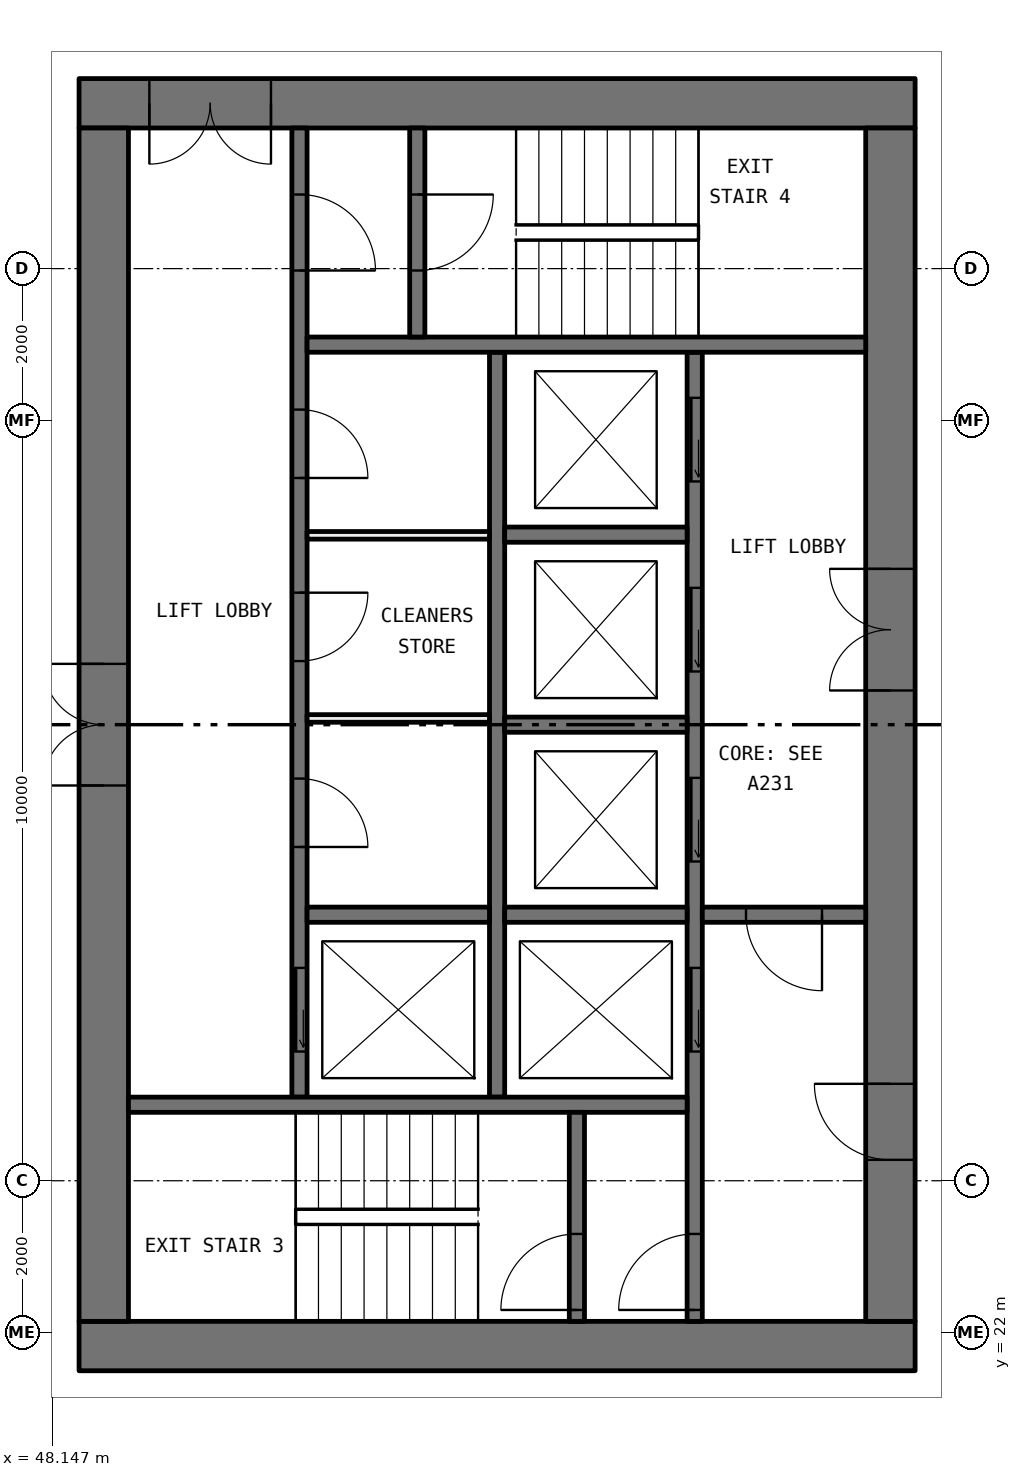
"""IFC4 building model, lengths in metres.
Left out: names, types, materials, properties, quantities, classifications, styles, units other than length and angle.
Written with IfcOpenShell. Run it as: python <this file> out.ifc"""

import sys

from ifc_helpers import new_model, si_unit, direction, frame, frame_2d, origin, place, context, subcontext, project, spatial, rectangle, extrude, element, fill, save


model = new_model("IFC4")
c1 = context("Model", 3, precision=1e-05, world=origin(), true_north=direction((0.0, 1.0)))
c2 = subcontext(c1, "Body", "Model", "MODEL_VIEW")
j1 = project(units=[si_unit("LENGTHUNIT", "METRE"), si_unit("PLANEANGLEUNIT", "RADIAN")], contexts=[c1])
p1 = place(None, origin())
s1 = spatial("IfcSite", under=j1, at=p1, CompositionType="ELEMENT")
p2 = place(p1, origin())
s2 = spatial("IfcBuilding", under=s1, at=p2, CompositionType="ELEMENT")
p3 = place(p2, frame((0.0, 0.0, 117.3)))
s3 = spatial("IfcBuildingStorey", under=s2, at=p3, CompositionType="ELEMENT", Elevation=117.3)
p4 = place(p3, frame((59.5, 21.825, 0.0), z_axis=(0.0, 0.0, 1.0), x_axis=(-1.0, 0.0, 0.0)))
e1 = element("IfcWall", 1, at=p4, inside=s3, PredefinedType="SHEAR", context=c2, shape_type="SweptSolid", body=[
    extrude(rectangle(XDim=11.0, YDim=0.65, at=frame_2d((5.5, 0.0))), origin(), (0.0, 0.0, 1.0), 3.05),
])
p5 = place(p3, frame((59.5, 38.175, 0.0), z_axis=(0.0, 0.0, 1.0), x_axis=(-1.0, 0.0, 0.0)))
e2 = element("IfcWall", 2, at=p5, inside=s3, PredefinedType="SHEAR", context=c2, shape_type="SweptSolid", body=[
    extrude(rectangle(XDim=11.0, YDim=0.65, at=frame_2d((5.5, 0.0))), origin(), (0.0, 0.0, 1.0), 3.05),
])
p6 = place(p5, frame((8.475, 0.0, 0.0)))
e3 = element("IfcOpeningElement", 3, at=p6, cuts=e2, PredefinedType="OPENING", context=c2, shape_type="SweptSolid", body=[
    extrude(rectangle(XDim=1.6, YDim=2.1, at=frame_2d((0.8, 1.05))), frame((0.0, 0.335, 0.0), z_axis=(0.0, -1.0, 0.0), x_axis=(1.0, 0.0, 0.0)), (0.0, 0.0, 1.0), 0.67),
])
p7 = place(p3, frame((59.175, 22.15, 0.0), z_axis=(0.0, 0.0, 1.0), x_axis=(0.0, 1.0, 0.0)))
e4 = element("IfcWall", 4, at=p7, inside=s3, PredefinedType="SHEAR", context=c2, shape_type="SweptSolid", body=[
    extrude(rectangle(XDim=15.7, YDim=0.65, at=frame_2d((7.85, 0.0))), origin(), (0.0, 0.0, 1.0), 3.05),
])
p8 = place(p7, frame((8.3, 0.0, 0.0)))
e5 = element("IfcOpeningElement", 5, at=p8, cuts=e4, PredefinedType="OPENING", context=c2, shape_type="SweptSolid", body=[
    extrude(rectangle(XDim=1.6, YDim=2.1, at=frame_2d((0.8, 1.05))), frame((0.0, 0.335, 0.0), z_axis=(0.0, -1.0, 0.0), x_axis=(1.0, 0.0, 0.0)), (0.0, 0.0, 1.0), 0.67),
])
p9 = place(p7, frame((2.125, 0.0, 0.0)))
e6 = element("IfcOpeningElement", 6, at=p9, cuts=e4, PredefinedType="OPENING", context=c2, shape_type="SweptSolid", body=[
    extrude(rectangle(XDim=1.0, YDim=2.1, at=frame_2d((0.5, 1.05))), frame((0.0, 0.335, 0.0), z_axis=(0.0, -1.0, 0.0), x_axis=(1.0, 0.0, 0.0)), (0.0, 0.0, 1.0), 0.67),
])
p10 = place(p3, frame((48.825, 22.15, 0.0), z_axis=(0.0, 0.0, 1.0), x_axis=(0.0, 1.0, 0.0)))
e7 = element("IfcWall", 7, at=p10, inside=s3, PredefinedType="SHEAR", context=c2, shape_type="SweptSolid", body=[
    extrude(rectangle(XDim=15.7, YDim=0.65, at=frame_2d((7.85, 0.0))), origin(), (0.0, 0.0, 1.0), 3.05),
])
p11 = place(p10, frame((7.05, 0.0, 0.0)))
e8 = element("IfcOpeningElement", 8, at=p11, cuts=e7, PredefinedType="OPENING", context=c2, shape_type="SweptSolid", body=[
    extrude(rectangle(XDim=1.6, YDim=2.1, at=frame_2d((0.8, 1.05))), frame((0.0, 0.335, 0.0), z_axis=(0.0, -1.0, 0.0), x_axis=(1.0, 0.0, 0.0)), (0.0, 0.0, 1.0), 0.67),
])
p12 = place(p3, frame((56.6, 22.15, 0.0), z_axis=(0.0, 0.0, 1.0), x_axis=(0.0, 1.0, 0.0)))
e9 = element("IfcWall", 9, at=p12, inside=s3, PredefinedType="SOLIDWALL", context=c2, shape_type="SweptSolid", body=[
    extrude(rectangle(XDim=12.75, YDim=0.2, at=frame_2d((6.375, 0.0))), origin(), (0.0, 0.0, 1.0), 3.05),
])
p13 = place(p12, frame((3.55, 0.0, 0.0)))
e10 = element("IfcOpeningElement", 10, at=p13, cuts=e9, PredefinedType="OPENING", context=c2, shape_type="SweptSolid", body=[
    extrude(rectangle(XDim=1.1, YDim=2.1, at=frame_2d((0.55, 1.05))), frame((0.0, 0.11, 0.0), z_axis=(0.0, -1.0, 0.0), x_axis=(1.0, 0.0, 0.0)), (0.0, 0.0, 1.0), 0.22),
])
p14 = place(p12, frame((6.05, 0.0, 0.0)))
e11 = element("IfcOpeningElement", 11, at=p14, cuts=e9, PredefinedType="OPENING", context=c2, shape_type="SweptSolid", body=[
    extrude(rectangle(XDim=1.1, YDim=2.1, at=frame_2d((0.55, 1.05))), frame((0.0, 0.11, 0.0), z_axis=(0.0, -1.0, 0.0), x_axis=(1.0, 0.0, 0.0)), (0.0, 0.0, 1.0), 0.22),
])
p15 = place(p12, frame((8.55, 0.0, 0.0)))
e12 = element("IfcOpeningElement", 12, at=p15, cuts=e9, PredefinedType="OPENING", context=c2, shape_type="SweptSolid", body=[
    extrude(rectangle(XDim=1.1, YDim=2.1, at=frame_2d((0.55, 1.05))), frame((0.0, 0.11, 0.0), z_axis=(0.0, -1.0, 0.0), x_axis=(1.0, 0.0, 0.0)), (0.0, 0.0, 1.0), 0.22),
])
p16 = place(p12, frame((11.05, 0.0, 0.0)))
e13 = element("IfcOpeningElement", 13, at=p16, cuts=e9, PredefinedType="OPENING", context=c2, shape_type="SweptSolid", body=[
    extrude(rectangle(XDim=1.1, YDim=2.1, at=frame_2d((0.55, 1.05))), frame((0.0, 0.11, 0.0), z_axis=(0.0, -1.0, 0.0), x_axis=(1.0, 0.0, 0.0)), (0.0, 0.0, 1.0), 0.22),
])
p17 = place(p12, frame((0.15, 0.0, 0.0)))
e14 = element("IfcOpeningElement", 14, at=p17, cuts=e9, PredefinedType="OPENING", context=c2, shape_type="SweptSolid", body=[
    extrude(rectangle(XDim=1.0, YDim=2.1, at=frame_2d((0.5, 1.05))), frame((0.0, 0.11, 0.0), z_axis=(0.0, -1.0, 0.0), x_axis=(1.0, 0.0, 0.0)), (0.0, 0.0, 1.0), 0.22),
])
p18 = place(p3, frame((51.4, 25.1, 0.0), z_axis=(0.0, 0.0, 1.0), x_axis=(0.0, 1.0, 0.0)))
e15 = element("IfcWall", 15, at=p18, inside=s3, PredefinedType="SOLIDWALL", context=c2, shape_type="SweptSolid", body=[
    extrude(rectangle(XDim=12.75, YDim=0.2, at=frame_2d((6.375, 0.0))), origin(), (0.0, 0.0, 1.0), 3.05),
])
p19 = place(p18, frame((0.6, 0.0, 0.0)))
e16 = element("IfcOpeningElement", 16, at=p19, cuts=e15, PredefinedType="OPENING", context=c2, shape_type="SweptSolid", body=[
    extrude(rectangle(XDim=1.1, YDim=2.1, at=frame_2d((0.55, 1.05))), frame((0.0, 0.11, 0.0), z_axis=(0.0, -1.0, 0.0), x_axis=(1.0, 0.0, 0.0)), (0.0, 0.0, 1.0), 0.22),
])
p20 = place(p18, frame((10.875, 0.0, 0.0)))
e17 = element("IfcOpeningElement", 17, at=p20, cuts=e15, PredefinedType="OPENING", context=c2, shape_type="SweptSolid", body=[
    extrude(rectangle(XDim=1.0, YDim=2.1, at=frame_2d((0.5, 1.05))), frame((0.0, 0.11, 0.0), z_axis=(0.0, -1.0, 0.0), x_axis=(1.0, 0.0, 0.0)), (0.0, 0.0, 1.0), 0.22),
])
p21 = place(p18, frame((3.291, 0.0, 0.0)))
e18 = element("IfcOpeningElement", 18, at=p21, cuts=e15, PredefinedType="OPENING", context=c2, shape_type="SweptSolid", body=[
    extrude(rectangle(XDim=0.9, YDim=2.1, at=frame_2d((0.45, 1.05))), frame((0.0, 0.11, 0.0), z_axis=(0.0, -1.0, 0.0), x_axis=(1.0, 0.0, 0.0)), (0.0, 0.0, 1.0), 0.22),
])
p22 = place(p18, frame((5.737, 0.0, 0.0)))
e19 = element("IfcOpeningElement", 19, at=p22, cuts=e15, PredefinedType="OPENING", context=c2, shape_type="SweptSolid", body=[
    extrude(rectangle(XDim=0.9, YDim=2.1, at=frame_2d((0.45, 1.05))), frame((0.0, 0.11, 0.0), z_axis=(0.0, -1.0, 0.0), x_axis=(1.0, 0.0, 0.0)), (0.0, 0.0, 1.0), 0.22),
])
p23 = place(p18, frame((8.146, 0.0, 0.0)))
e20 = element("IfcOpeningElement", 20, at=p23, cuts=e15, PredefinedType="OPENING", context=c2, shape_type="SweptSolid", body=[
    extrude(rectangle(XDim=0.9, YDim=2.1, at=frame_2d((0.45, 1.05))), frame((0.0, 0.11, 0.0), z_axis=(0.0, -1.0, 0.0), x_axis=(1.0, 0.0, 0.0)), (0.0, 0.0, 1.0), 0.22),
])
p24 = place(p3, frame((54.0, 25.1, 0.0), z_axis=(0.0, 0.0, 1.0), x_axis=(0.0, 1.0, 0.0)))
e21 = element("IfcWall", 21, at=p24, inside=s3, PredefinedType="SOLIDWALL", context=c2, shape_type="SweptSolid", body=[
    extrude(rectangle(XDim=9.8, YDim=0.2, at=frame_2d((4.9, 0.0))), origin(), (0.0, 0.0, 1.0), 3.05),
])
for number, where, z_axis, x_axis in (
    (22, (56.5, 25.0, 0.0), (0.0, 0.0, 1.0), (-1.0, 0.0, 0.0)),
    (23, (58.85, 35.0, 0.0), (0.0, 0.0, 1.0), (-1.0, 0.0, 0.0)),
):
    element("IfcWall", number, at=place(p3, frame(where, z_axis=z_axis, x_axis=x_axis)), inside=s3, PredefinedType="SOLIDWALL", context=c2, shape_type="SweptSolid", body=[
        extrude(rectangle(XDim=7.35, YDim=0.2, at=frame_2d((3.675, 0.0))), origin(), (0.0, 0.0, 1.0), 3.05),
    ])
p25 = place(p3, frame((58.85, 27.5, 0.0), z_axis=(0.0, 0.0, 1.0), x_axis=(-1.0, 0.0, 0.0)))
e24 = element("IfcWall", 24, at=p25, inside=s3, PredefinedType="SOLIDWALL", context=c2, shape_type="SweptSolid", body=[
    extrude(rectangle(XDim=2.15, YDim=0.2, at=frame_2d((1.075, 0.0))), origin(), (0.0, 0.0, 1.0), 3.05),
])
p26 = place(p25, frame((0.575, 0.0, 0.0)))
e25 = element("IfcOpeningElement", 25, at=p26, cuts=e24, PredefinedType="OPENING", context=c2, shape_type="SweptSolid", body=[
    extrude(rectangle(XDim=1.0, YDim=2.1, at=frame_2d((0.5, 1.05))), frame((0.0, 0.11, 0.0), z_axis=(0.0, -1.0, 0.0), x_axis=(1.0, 0.0, 0.0)), (0.0, 0.0, 1.0), 0.22),
])
p27 = place(p3, frame((55.05, 22.15, 0.0), z_axis=(0.0, 0.0, 1.0), x_axis=(0.0, 1.0, 0.0)))
e26 = element("IfcWall", 26, at=p27, inside=s3, PredefinedType="SOLIDWALL", context=c2, shape_type="SweptSolid", body=[
    extrude(rectangle(XDim=2.75, YDim=0.2, at=frame_2d((1.375, 0.0))), origin(), (0.0, 0.0, 1.0), 3.05),
])
p28 = place(p27, frame((0.15, 0.0, 0.0)))
e27 = element("IfcOpeningElement", 27, at=p28, cuts=e26, PredefinedType="OPENING", context=c2, shape_type="SweptSolid", body=[
    extrude(rectangle(XDim=1.0, YDim=2.1, at=frame_2d((0.5, 1.05))), frame((0.0, 0.11, 0.0), z_axis=(0.0, -1.0, 0.0), x_axis=(1.0, 0.0, 0.0)), (0.0, 0.0, 1.0), 0.22),
])
p29 = place(p3, frame((52.95, 35.1, 0.0), z_axis=(0.0, 0.0, 1.0), x_axis=(0.0, 1.0, 0.0)))
e28 = element("IfcWall", 28, at=p29, inside=s3, PredefinedType="SOLIDWALL", context=c2, shape_type="SweptSolid", body=[
    extrude(rectangle(XDim=2.75, YDim=0.2, at=frame_2d((1.375, 0.0))), origin(), (0.0, 0.0, 1.0), 3.05),
])
p30 = place(p29, frame((0.875, 0.0, 0.0)))
e29 = element("IfcOpeningElement", 29, at=p30, cuts=e28, PredefinedType="OPENING", context=c2, shape_type="SweptSolid", body=[
    extrude(rectangle(XDim=1.0, YDim=2.1, at=frame_2d((0.5, 1.05))), frame((0.0, 0.11, 0.0), z_axis=(0.0, -1.0, 0.0), x_axis=(1.0, 0.0, 0.0)), (0.0, 0.0, 1.0), 0.22),
])
for number, where, z_axis, x_axis in (
    (30, (56.5, 27.5, 0.0), (0.0, 0.0, 1.0), (-1.0, 0.0, 0.0)),
    (31, (56.5, 30.0, 0.0), (0.0, 0.0, 1.0), (-1.0, 0.0, 0.0)),
    (32, (56.5, 32.5, 0.0), (0.0, 0.0, 1.0), (-1.0, 0.0, 0.0)),
    (33, (53.9, 27.5, 0.0), (0.0, 0.0, 1.0), (-1.0, 0.0, 0.0)),
):
    element("IfcWall", number, at=place(p3, frame(where, z_axis=z_axis, x_axis=x_axis)), inside=s3, PredefinedType="SOLIDWALL", context=c2, shape_type="SweptSolid", body=[
        extrude(rectangle(XDim=2.4, YDim=0.2, at=frame_2d((1.2, 0.0))), origin(), (0.0, 0.0, 1.0), 3.05),
    ])
for number, where, z_axis, x_axis in (
    (34, (53.9, 30.082, 0.0), (0.0, 0.0, 1.0), (-1.0, 0.0, 0.0)),
    (35, (53.9, 32.491, 0.0), (0.0, 0.0, 1.0), (-1.0, 0.0, 0.0)),
):
    element("IfcWall", number, at=place(p3, frame(where, z_axis=z_axis, x_axis=x_axis)), inside=s3, PredefinedType="PARTITIONING", context=c2, shape_type="SweptSolid", body=[
        extrude(rectangle(XDim=2.4, YDim=0.1, at=frame_2d((1.2, 0.0))), origin(), (0.0, 0.0, 1.0), 3.05),
    ])
p31 = place(p19, origin())
e36 = element("IfcDoor", 36, at=p31, inside=s3, OperationType="SLIDING_TO_LEFT", PredefinedType="DOOR", context=c2, shape_type="SweptSolid", body=[
    extrude(rectangle(XDim=1.1, YDim=2.1, at=frame_2d((0.55, 1.05))), frame((0.0, 0.025, 0.0), z_axis=(0.0, -1.0, 0.0), x_axis=(1.0, 0.0, 0.0)), (0.0, 0.0, 1.0), 0.05),
])
fill(e16, e36)
p32 = place(p13, origin())
e37 = element("IfcDoor", 37, at=p32, inside=s3, OperationType="SLIDING_TO_LEFT", PredefinedType="DOOR", context=c2, shape_type="SweptSolid", body=[
    extrude(rectangle(XDim=1.1, YDim=2.1, at=frame_2d((0.55, 1.05))), frame((0.0, 0.025, 0.0), z_axis=(0.0, -1.0, 0.0), x_axis=(1.0, 0.0, 0.0)), (0.0, 0.0, 1.0), 0.05),
])
fill(e10, e37)
p33 = place(p14, origin())
e38 = element("IfcDoor", 38, at=p33, inside=s3, OperationType="SLIDING_TO_LEFT", PredefinedType="DOOR", context=c2, shape_type="SweptSolid", body=[
    extrude(rectangle(XDim=1.1, YDim=2.1, at=frame_2d((0.55, 1.05))), frame((0.0, 0.025, 0.0), z_axis=(0.0, -1.0, 0.0), x_axis=(1.0, 0.0, 0.0)), (0.0, 0.0, 1.0), 0.05),
])
fill(e11, e38)
p34 = place(p15, origin())
e39 = element("IfcDoor", 39, at=p34, inside=s3, OperationType="SLIDING_TO_LEFT", PredefinedType="DOOR", context=c2, shape_type="SweptSolid", body=[
    extrude(rectangle(XDim=1.1, YDim=2.1, at=frame_2d((0.55, 1.05))), frame((0.0, 0.025, 0.0), z_axis=(0.0, -1.0, 0.0), x_axis=(1.0, 0.0, 0.0)), (0.0, 0.0, 1.0), 0.05),
])
fill(e12, e39)
p35 = place(p16, origin())
e40 = element("IfcDoor", 40, at=p35, inside=s3, OperationType="SLIDING_TO_LEFT", PredefinedType="DOOR", context=c2, shape_type="SweptSolid", body=[
    extrude(rectangle(XDim=1.1, YDim=2.1, at=frame_2d((0.55, 1.05))), frame((0.0, 0.025, 0.0), z_axis=(0.0, -1.0, 0.0), x_axis=(1.0, 0.0, 0.0)), (0.0, 0.0, 1.0), 0.05),
])
fill(e13, e40)
p36 = place(p28, origin())
e41 = element("IfcDoor", 41, at=p36, inside=s3, OperationType="SINGLE_SWING_RIGHT", PredefinedType="DOOR", context=c2, shape_type="SweptSolid", body=[
    extrude(rectangle(XDim=1.0, YDim=2.1, at=frame_2d((0.5, 1.05))), frame((0.0, 0.025, 0.0), z_axis=(0.0, -1.0, 0.0), x_axis=(1.0, 0.0, 0.0)), (0.0, 0.0, 1.0), 0.05),
])
fill(e27, e41)
p37 = place(p17, origin())
e42 = element("IfcDoor", 42, at=p37, inside=s3, OperationType="SINGLE_SWING_RIGHT", PredefinedType="DOOR", context=c2, shape_type="SweptSolid", body=[
    extrude(rectangle(XDim=1.0, YDim=2.1, at=frame_2d((0.5, 1.05))), frame((0.0, 0.025, 0.0), z_axis=(0.0, -1.0, 0.0), x_axis=(1.0, 0.0, 0.0)), (0.0, 0.0, 1.0), 0.05),
])
fill(e14, e42)
p38 = place(p20, frame((1.0, 0.0, 0.0), x_axis=(-1.0, 0.0, 0.0)))
e43 = element("IfcDoor", 43, at=p38, inside=s3, OperationType="SINGLE_SWING_LEFT", PredefinedType="DOOR", context=c2, shape_type="SweptSolid", body=[
    extrude(rectangle(XDim=1.0, YDim=2.1, at=frame_2d((0.5, 1.05))), frame((0.0, 0.025, 0.0), z_axis=(0.0, -1.0, 0.0), x_axis=(1.0, 0.0, 0.0)), (0.0, 0.0, 1.0), 0.05),
])
fill(e17, e43)
p39 = place(p30, frame((1.0, 0.0, 0.0), x_axis=(-1.0, 0.0, 0.0)))
e44 = element("IfcDoor", 44, at=p39, inside=s3, OperationType="SINGLE_SWING_RIGHT", PredefinedType="DOOR", context=c2, shape_type="SweptSolid", body=[
    extrude(rectangle(XDim=1.0, YDim=2.1, at=frame_2d((0.5, 1.05))), frame((0.0, 0.025, 0.0), z_axis=(0.0, -1.0, 0.0), x_axis=(1.0, 0.0, 0.0)), (0.0, 0.0, 1.0), 0.05),
])
fill(e29, e44)
p40 = place(p26, origin())
e45 = element("IfcDoor", 45, at=p40, inside=s3, OperationType="SINGLE_SWING_RIGHT", PredefinedType="DOOR", context=c2, shape_type="SweptSolid", body=[
    extrude(rectangle(XDim=1.0, YDim=2.1, at=frame_2d((0.5, 1.05))), frame((0.0, 0.025, 0.0), z_axis=(0.0, -1.0, 0.0), x_axis=(1.0, 0.0, 0.0)), (0.0, 0.0, 1.0), 0.05),
])
fill(e25, e45)
p41 = place(p8, origin())
e46 = element("IfcDoor", 46, at=p41, inside=s3, OperationType="DOUBLE_DOOR_SINGLE_SWING", PredefinedType="DOOR", context=c2, shape_type="SweptSolid", body=[
    extrude(rectangle(XDim=1.6, YDim=2.1, at=frame_2d((0.8, 1.05))), frame((0.0, 0.025, 0.0), z_axis=(0.0, -1.0, 0.0), x_axis=(1.0, 0.0, 0.0)), (0.0, 0.0, 1.0), 0.05),
])
fill(e5, e46)
p42 = place(p9, origin())
e47 = element("IfcDoor", 47, at=p42, inside=s3, OperationType="SINGLE_SWING_LEFT", PredefinedType="DOOR", context=c2, shape_type="SweptSolid", body=[
    extrude(rectangle(XDim=1.0, YDim=2.1, at=frame_2d((0.5, 1.05))), frame((0.0, 0.025, 0.0), z_axis=(0.0, -1.0, 0.0), x_axis=(1.0, 0.0, 0.0)), (0.0, 0.0, 1.0), 0.05),
])
fill(e6, e47)
p43 = place(p6, origin())
e48 = element("IfcDoor", 48, at=p43, inside=s3, OperationType="DOUBLE_DOOR_SINGLE_SWING", PredefinedType="DOOR", context=c2, shape_type="SweptSolid", body=[
    extrude(rectangle(XDim=1.6, YDim=2.1, at=frame_2d((0.8, 1.05))), frame((0.0, 0.025, 0.0), z_axis=(0.0, -1.0, 0.0), x_axis=(1.0, 0.0, 0.0)), (0.0, 0.0, 1.0), 0.05),
])
fill(e3, e48)
p44 = place(p11, origin())
e49 = element("IfcDoor", 49, at=p44, inside=s3, OperationType="DOUBLE_DOOR_SINGLE_SWING", PredefinedType="DOOR", context=c2, shape_type="SweptSolid", body=[
    extrude(rectangle(XDim=1.6, YDim=2.1, at=frame_2d((0.8, 1.05))), frame((0.0, 0.025, 0.0), z_axis=(0.0, -1.0, 0.0), x_axis=(1.0, 0.0, 0.0)), (0.0, 0.0, 1.0), 0.05),
])
fill(e8, e49)
p45 = place(p21, frame((0.9, 0.0, 0.0), x_axis=(-1.0, 0.0, 0.0)))
e50 = element("IfcDoor", 50, at=p45, inside=s3, OperationType="SINGLE_SWING_LEFT", PredefinedType="DOOR", context=c2, shape_type="SweptSolid", body=[
    extrude(rectangle(XDim=0.9, YDim=2.1, at=frame_2d((0.45, 1.05))), frame((0.0, 0.025, 0.0), z_axis=(0.0, -1.0, 0.0), x_axis=(1.0, 0.0, 0.0)), (0.0, 0.0, 1.0), 0.05),
])
fill(e18, e50)
p46 = place(p22, frame((0.9, 0.0, 0.0), x_axis=(-1.0, 0.0, 0.0)))
e51 = element("IfcDoor", 51, at=p46, inside=s3, OperationType="SINGLE_SWING_RIGHT", PredefinedType="DOOR", context=c2, shape_type="SweptSolid", body=[
    extrude(rectangle(XDim=0.9, YDim=2.1, at=frame_2d((0.45, 1.05))), frame((0.0, 0.025, 0.0), z_axis=(0.0, -1.0, 0.0), x_axis=(1.0, 0.0, 0.0)), (0.0, 0.0, 1.0), 0.05),
])
fill(e19, e51)
p47 = place(p23, frame((0.9, 0.0, 0.0), x_axis=(-1.0, 0.0, 0.0)))
e52 = element("IfcDoor", 52, at=p47, inside=s3, OperationType="SINGLE_SWING_LEFT", PredefinedType="DOOR", context=c2, shape_type="SweptSolid", body=[
    extrude(rectangle(XDim=0.9, YDim=2.1, at=frame_2d((0.45, 1.05))), frame((0.0, 0.025, 0.0), z_axis=(0.0, -1.0, 0.0), x_axis=(1.0, 0.0, 0.0)), (0.0, 0.0, 1.0), 0.05),
])
fill(e20, e52)
save(model, sys.argv[1])
